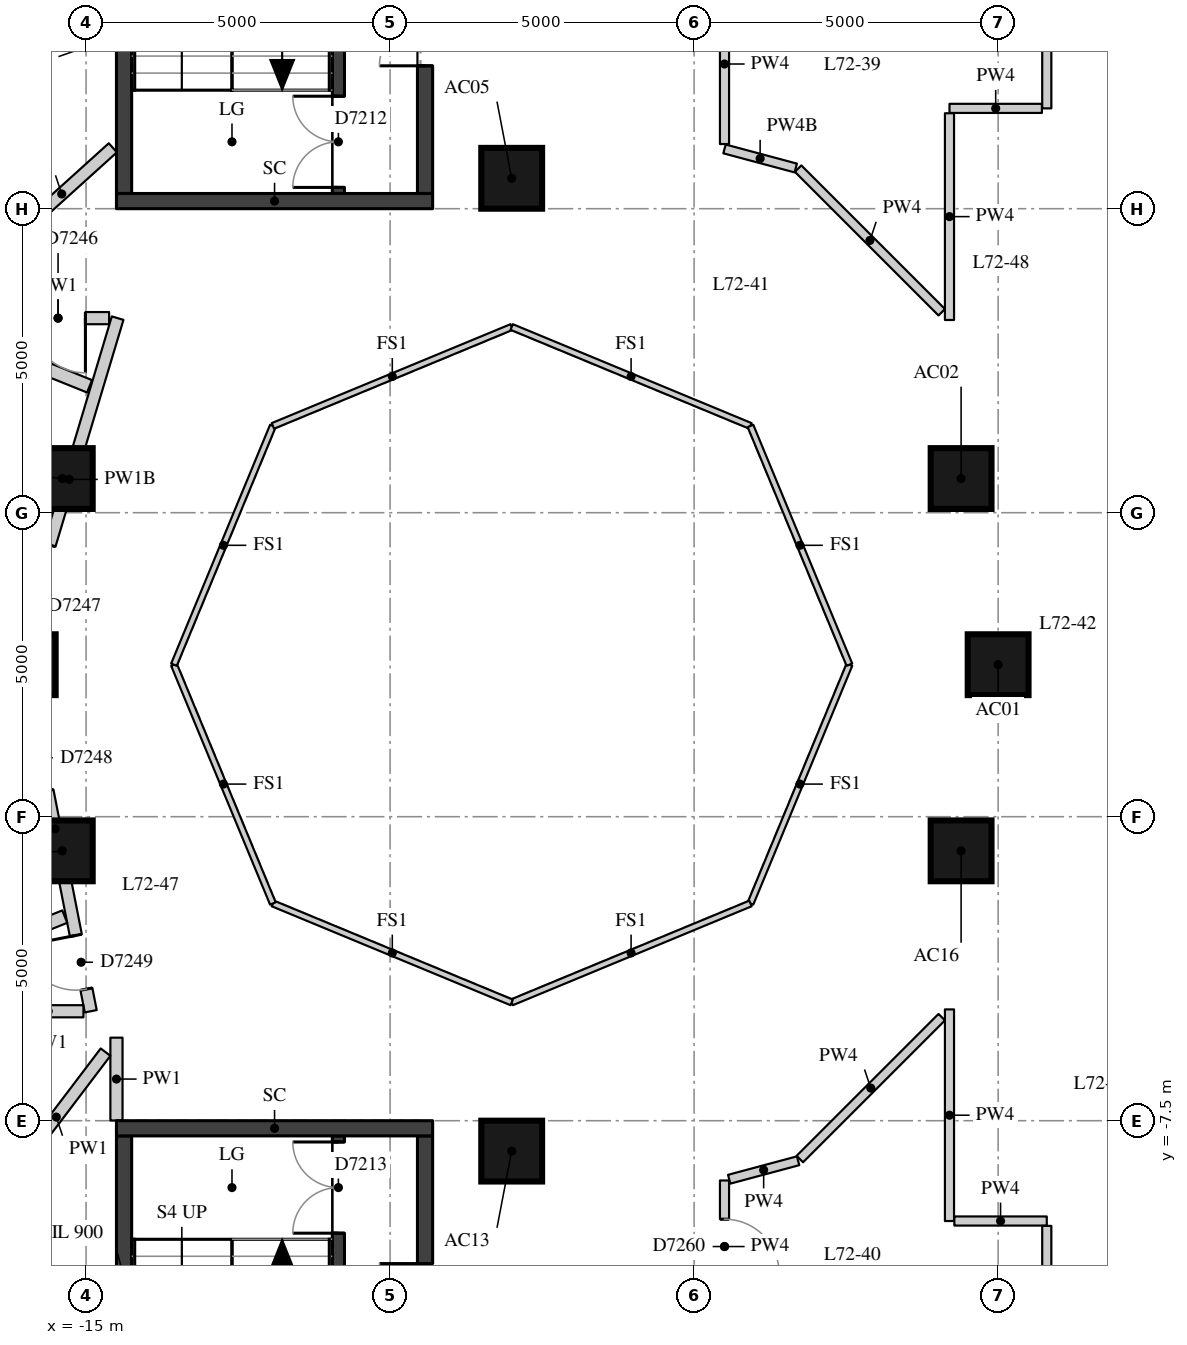
"""IFC4 building model, lengths in metres.
Left out: names, types, materials, properties, quantities, classifications, styles, units other than length and angle.
Written with IfcOpenShell. Run it as: python <this file> out.ifc"""

import sys

from ifc_helpers import new_model, si_unit, direction, frame, frame_2d, origin, origin_2d, place, context, subcontext, project, spatial, rectangle, extrude, element, fill, save


model = new_model("IFC4")
c1 = context("Model", 3, precision=1e-05, world=origin(), true_north=direction((0.0, 1.0)))
c2 = subcontext(c1, "Body", "Model", "MODEL_VIEW")
j1 = project(units=[si_unit("LENGTHUNIT", "METRE"), si_unit("PLANEANGLEUNIT", "RADIAN")], contexts=[c1])
p1 = place(None, origin())
s1 = spatial("IfcSite", under=j1, at=p1, CompositionType="ELEMENT")
p2 = place(p1, origin())
s2 = spatial("IfcBuilding", under=s1, at=p2, CompositionType="ELEMENT")
p3 = place(p2, frame((0.0, 0.0, 253.1)))
s3 = spatial("IfcBuildingStorey", under=s2, at=p3, CompositionType="ELEMENT", Elevation=253.1)
for number, where, z_axis, x_axis in (
    (1, (0.0, 0.0, 0.0), (0.0, 0.0, 1.0), (1.0, 0.0, 0.0)),
    (2, (-0.609, 3.062, 0.0), (0.0, 0.0, 1.0), (1.0, 0.0, 0.0)),
    (3, (-8.0, 8.0, 0.0), (0.0, 0.0, 1.0), (1.0, 0.0, 0.0)),
    (4, (-15.391, 3.062, 0.0), (0.0, 0.0, 1.0), (1.0, 0.0, 0.0)),
    (5, (-16.0, 0.0, 0.0), (0.0, 0.0, 1.0), (1.0, 0.0, 0.0)),
    (6, (-15.391, -3.062, 0.0), (0.0, 0.0, 1.0), (1.0, 0.0, 0.0)),
    (7, (-8.0, -8.0, 0.0), (0.0, 0.0, 1.0), (1.0, 0.0, 0.0)),
    (8, (-0.609, -3.062, 0.0), (0.0, 0.0, 1.0), (1.0, 0.0, 0.0)),
):
    element("IfcColumn", number, at=place(p3, frame(where, z_axis=z_axis, x_axis=x_axis)), inside=s3, PredefinedType="COLUMN", context=c2, shape_type="SweptSolid", body=[
        extrude(rectangle(XDim=1.0, YDim=1.0, at=origin_2d()), origin(), (0.0, 0.0, 1.0), 3.3),
    ])
p4 = place(p3, frame((-10.85, 7.75, 0.0), z_axis=(0.0, 0.0, 1.0), x_axis=(0.0, 1.0, 0.0)))
e9 = element("IfcWall", 9, at=p4, inside=s3, PredefinedType="SHEAR", context=c2, shape_type="SweptSolid", body=[
    extrude(rectangle(XDim=6.0, YDim=0.2, at=frame_2d((3.0, 0.0))), origin(), (0.0, 0.0, 1.0), 3.02),
])
p5 = place(p4, frame((0.1, 0.0, 0.0)))
e10 = element("IfcOpeningElement", 10, at=p5, cuts=e9, PredefinedType="OPENING", context=c2, shape_type="SweptSolid", body=[
    extrude(rectangle(XDim=1.5, YDim=2.1, at=frame_2d((0.75, 1.05))), frame((0.0, 0.11, 0.0), z_axis=(0.0, -1.0, 0.0), x_axis=(1.0, 0.0, 0.0)), (0.0, 0.0, 1.0), 0.22),
])
p6 = place(p3, frame((-10.85, -13.75, 0.0), z_axis=(0.0, 0.0, 1.0), x_axis=(0.0, 1.0, 0.0)))
e11 = element("IfcWall", 11, at=p6, inside=s3, PredefinedType="SHEAR", context=c2, shape_type="SweptSolid", body=[
    extrude(rectangle(XDim=6.0, YDim=0.2, at=frame_2d((3.0, 0.0))), origin(), (0.0, 0.0, 1.0), 3.02),
])
p7 = place(p6, frame((4.4, 0.0, 0.0)))
e12 = element("IfcOpeningElement", 12, at=p7, cuts=e11, PredefinedType="OPENING", context=c2, shape_type="SweptSolid", body=[
    extrude(rectangle(XDim=1.5, YDim=2.1, at=frame_2d((0.75, 1.05))), frame((0.0, 0.11, 0.0), z_axis=(0.0, -1.0, 0.0), x_axis=(1.0, 0.0, 0.0)), (0.0, 0.0, 1.0), 0.22),
])
p8 = place(p3, frame((-14.375, 7.75, -0.28), z_axis=(0.0, 0.0, 1.0), x_axis=(0.0, 1.0, 0.0)))
e13 = element("IfcWall", 13, at=p8, inside=s3, PredefinedType="SHEAR", context=c2, shape_type="SweptSolid", body=[
    extrude(rectangle(XDim=6.0, YDim=0.25, at=frame_2d((3.0, 0.0))), origin(), (0.0, 0.0, 1.0), 3.3),
])
p9 = place(p3, frame((-9.425, 7.75, -0.28), z_axis=(0.0, 0.0, 1.0), x_axis=(0.0, 1.0, 0.0)))
e14 = element("IfcWall", 14, at=p9, inside=s3, PredefinedType="SHEAR", context=c2, shape_type="SweptSolid", body=[
    extrude(rectangle(XDim=6.0, YDim=0.25, at=frame_2d((3.0, 0.0))), origin(), (0.0, 0.0, 1.0), 3.3),
])
p10 = place(p9, frame((2.1, 0.0, 0.28)))
e15 = element("IfcOpeningElement", 15, at=p10, cuts=e14, PredefinedType="OPENING", context=c2, shape_type="SweptSolid", body=[
    extrude(rectangle(XDim=1.5, YDim=2.1, at=frame_2d((0.75, 1.05))), frame((0.0, 0.135, 0.0), z_axis=(0.0, -1.0, 0.0), x_axis=(1.0, 0.0, 0.0)), (0.0, 0.0, 1.0), 0.27),
])
p11 = place(p3, frame((-14.5, 7.625, -0.28), z_axis=(0.0, 0.0, 1.0), x_axis=(1.0, 0.0, 0.0)))
e16 = element("IfcWall", 16, at=p11, inside=s3, PredefinedType="SHEAR", context=c2, shape_type="SweptSolid", body=[
    extrude(rectangle(XDim=5.2, YDim=0.25, at=frame_2d((2.6, 0.0))), origin(), (0.0, 0.0, 1.0), 3.3),
])
p12 = place(p3, frame((-14.375, -13.75, -0.28), z_axis=(0.0, 0.0, 1.0), x_axis=(0.0, 1.0, 0.0)))
e17 = element("IfcWall", 17, at=p12, inside=s3, PredefinedType="SHEAR", context=c2, shape_type="SweptSolid", body=[
    extrude(rectangle(XDim=6.0, YDim=0.25, at=frame_2d((3.0, 0.0))), origin(), (0.0, 0.0, 1.0), 3.3),
])
p13 = place(p3, frame((-9.425, -13.75, -0.28), z_axis=(0.0, 0.0, 1.0), x_axis=(0.0, 1.0, 0.0)))
e18 = element("IfcWall", 18, at=p13, inside=s3, PredefinedType="SHEAR", context=c2, shape_type="SweptSolid", body=[
    extrude(rectangle(XDim=6.0, YDim=0.25, at=frame_2d((3.0, 0.0))), origin(), (0.0, 0.0, 1.0), 3.3),
])
p14 = place(p13, frame((2.4, 0.0, 0.28)))
e19 = element("IfcOpeningElement", 19, at=p14, cuts=e18, PredefinedType="OPENING", context=c2, shape_type="SweptSolid", body=[
    extrude(rectangle(XDim=1.5, YDim=2.1, at=frame_2d((0.75, 1.05))), frame((0.0, 0.135, 0.0), z_axis=(0.0, -1.0, 0.0), x_axis=(1.0, 0.0, 0.0)), (0.0, 0.0, 1.0), 0.27),
])
p15 = place(p3, frame((-14.5, -7.625, -0.28), z_axis=(0.0, 0.0, 1.0), x_axis=(1.0, 0.0, 0.0)))
e20 = element("IfcWall", 20, at=p15, inside=s3, PredefinedType="SHEAR", context=c2, shape_type="SweptSolid", body=[
    extrude(rectangle(XDim=5.2, YDim=0.25, at=frame_2d((2.6, 0.0))), origin(), (0.0, 0.0, 1.0), 3.3),
])
p16 = place(p3, frame((-14.923, -5.7, 0.0), z_axis=(0.0, 0.0, 1.0), x_axis=(-0.192536596074, 0.981289793676, 0.0)))
e21 = element("IfcWall", 21, at=p16, inside=s3, PredefinedType="PARTITIONING", context=c2, shape_type="SweptSolid", body=[
    extrude(rectangle(XDim=6.115, YDim=0.2, at=frame_2d((3.057, 0.0))), origin(), (0.0, 0.0, 1.0), 2.52),
])
p17 = place(p16, frame((3.699, 0.0, 0.0)))
e22 = element("IfcOpeningElement", 22, at=p17, cuts=e21, PredefinedType="OPENING", context=c2, shape_type="SweptSolid", body=[
    extrude(rectangle(XDim=1.1, YDim=2.1, at=frame_2d((0.55, 1.05))), frame((0.0, 0.11, 0.0), z_axis=(0.0, -1.0, 0.0), x_axis=(1.0, 0.0, 0.0)), (0.0, 0.0, 1.0), 0.22),
])
p18 = place(p16, frame((0.372, 0.0, 0.0)))
e23 = element("IfcOpeningElement", 23, at=p18, cuts=e21, PredefinedType="OPENING", context=c2, shape_type="SweptSolid", body=[
    extrude(rectangle(XDim=0.9, YDim=2.1, at=frame_2d((0.45, 1.05))), frame((0.0, 0.11, 0.0), z_axis=(0.0, -1.0, 0.0), x_axis=(1.0, 0.0, 0.0)), (0.0, 0.0, 1.0), 0.22),
])
p19 = place(p3, frame((-16.071, 0.395, 0.0), z_axis=(0.0, 0.0, 1.0), x_axis=(0.287129472402, 0.957891782029, 0.0)))
e24 = element("IfcWall", 24, at=p19, inside=s3, PredefinedType="PARTITIONING", context=c2, shape_type="SweptSolid", body=[
    extrude(rectangle(XDim=5.538, YDim=0.2, at=frame_2d((2.769, 0.0))), origin(), (0.0, 0.0, 1.0), 2.52),
])
p20 = place(p19, frame((0.543, 0.0, 0.0)))
e25 = element("IfcOpeningElement", 25, at=p20, cuts=e24, PredefinedType="OPENING", context=c2, shape_type="SweptSolid", body=[
    extrude(rectangle(XDim=1.1, YDim=2.1, at=frame_2d((0.55, 1.05))), frame((0.0, 0.11, 0.0), z_axis=(0.0, -1.0, 0.0), x_axis=(1.0, 0.0, 0.0)), (0.0, 0.0, 1.0), 0.22),
])
p21 = place(p3, frame((-14.621, 5.7, 0.0), z_axis=(0.0, 0.0, 1.0), x_axis=(-1.0, 0.0, 0.0)))
e26 = element("IfcWall", 26, at=p21, inside=s3, PredefinedType="PARTITIONING", context=c2, shape_type="SweptSolid", body=[
    extrude(rectangle(XDim=1.679, YDim=0.2, at=frame_2d((0.84, 0.0))), origin(), (0.0, 0.0, 1.0), 3.02),
])
p22 = place(p21, frame((0.39, 0.0, 0.0)))
e27 = element("IfcOpeningElement", 27, at=p22, cuts=e26, PredefinedType="OPENING", context=c2, shape_type="SweptSolid", body=[
    extrude(rectangle(XDim=0.9, YDim=2.1, at=frame_2d((0.45, 1.05))), frame((0.0, 0.11, 0.0), z_axis=(0.0, -1.0, 0.0), x_axis=(1.0, 0.0, 0.0)), (0.0, 0.0, 1.0), 0.22),
])
p23 = place(p3, frame((-16.24, 6.984, 0.0), z_axis=(0.0, 0.0, 1.0), x_axis=(0.742140692687, 0.67024412885, 0.0)))
e28 = element("IfcWall", 28, at=p23, inside=s3, PredefinedType="PARTITIONING", context=c2, shape_type="SweptSolid", body=[
    extrude(rectangle(XDim=2.265, YDim=0.2, at=frame_2d((1.132, 0.0))), origin(), (0.0, 0.0, 1.0), 3.02),
])
p24 = place(p3, frame((-14.5, -7.496, 0.0), z_axis=(0.0, 0.0, 1.0), x_axis=(0.0, 1.0, 0.0)))
e29 = element("IfcWall", 29, at=p24, inside=s3, PredefinedType="PARTITIONING", context=c2, shape_type="SweptSolid", body=[
    extrude(rectangle(XDim=1.362, YDim=0.2, at=frame_2d((0.681, 0.0))), origin(), (0.0, 0.0, 1.0), 3.02),
])
p25 = place(p3, frame((-14.679, -6.372, 0.0), z_axis=(0.0, 0.0, 1.0), x_axis=(-0.604258962547, -0.796787993247, 0.0)))
e30 = element("IfcWall", 30, at=p25, inside=s3, PredefinedType="PARTITIONING", context=c2, shape_type="SweptSolid", body=[
    extrude(rectangle(XDim=2.682, YDim=0.2, at=frame_2d((1.341, 0.0))), origin(), (0.0, 0.0, 1.0), 3.02),
])
p26 = place(p3, frame((-16.2, -5.7, 0.0), z_axis=(0.0, 0.0, 1.0), x_axis=(1.0, 0.0, 0.0)))
e31 = element("IfcWall", 31, at=p26, inside=s3, PredefinedType="PARTITIONING", context=c2, shape_type="SweptSolid", body=[
    extrude(rectangle(XDim=1.157, YDim=0.2, at=frame_2d((0.579, 0.0))), origin(), (0.0, 0.0, 1.0), 3.02),
])
p27 = place(p3, frame((0.8, 12.057, 0.0), z_axis=(0.0, 0.0, 1.0), x_axis=(0.0, -1.0, 0.0)))
e32 = element("IfcWall", 32, at=p27, inside=s3, PredefinedType="PARTITIONING", context=c2, shape_type="SweptSolid", body=[
    extrude(rectangle(XDim=2.907, YDim=0.15, at=frame_2d((1.454, 0.0))), origin(), (0.0, 0.0, 1.0), 3.02),
])
p28 = place(p27, frame((1.003, 0.0, 0.0)))
e33 = element("IfcOpeningElement", 33, at=p28, cuts=e32, PredefinedType="OPENING", context=c2, shape_type="SweptSolid", body=[
    extrude(rectangle(XDim=0.9, YDim=2.1, at=frame_2d((0.45, 1.05))), frame((0.0, 0.085, 0.0), z_axis=(0.0, -1.0, 0.0), x_axis=(1.0, 0.0, 0.0)), (0.0, 0.0, 1.0), 0.17),
])
p29 = place(p3, frame((0.72, 9.15, 0.0), z_axis=(0.0, 0.0, 1.0), x_axis=(-1.0, 0.0, 0.0)))
e34 = element("IfcWall", 34, at=p29, inside=s3, PredefinedType="PARTITIONING", context=c2, shape_type="SweptSolid", body=[
    extrude(rectangle(XDim=1.52, YDim=0.15, at=frame_2d((0.76, 0.0))), origin(), (0.0, 0.0, 1.0), 3.02),
])
p30 = place(p3, frame((-0.8, 9.07, 0.0), z_axis=(0.0, 0.0, 1.0), x_axis=(0.0, -1.0, 0.0)))
e35 = element("IfcWall", 35, at=p30, inside=s3, PredefinedType="PARTITIONING", context=c2, shape_type="SweptSolid", body=[
    extrude(rectangle(XDim=3.4, YDim=0.15, at=frame_2d((1.7, 0.0))), origin(), (0.0, 0.0, 1.0), 3.02),
])
p31 = place(p3, frame((-0.927, 5.797, 0.0), z_axis=(0.0, 0.0, 1.0), x_axis=(-0.707106781187, 0.707106781187, 0.0)))
e36 = element("IfcWall", 36, at=p31, inside=s3, PredefinedType="PARTITIONING", context=c2, shape_type="SweptSolid", body=[
    extrude(rectangle(XDim=3.341, YDim=0.15, at=frame_2d((1.67, 0.0))), origin(), (0.0, 0.0, 1.0), 3.02),
])
p32 = place(p3, frame((-3.328, 8.169, 0.0), z_axis=(0.0, 0.0, 1.0), x_axis=(-0.965933680277, 0.258789731841, 0.0)))
e37 = element("IfcWall", 37, at=p32, inside=s3, PredefinedType="PARTITIONING", context=c2, shape_type="SweptSolid", body=[
    extrude(rectangle(XDim=1.213, YDim=0.15, at=frame_2d((0.606, 0.0))), origin(), (0.0, 0.0, 1.0), 2.47),
])
p33 = place(p3, frame((-4.5, 8.563, 0.0), z_axis=(0.0, 0.0, 1.0), x_axis=(0.0, 1.0, 0.0)))
e38 = element("IfcWall", 38, at=p33, inside=s3, PredefinedType="PARTITIONING", context=c2, shape_type="SweptSolid", body=[
    extrude(rectangle(XDim=2.633, YDim=0.15, at=frame_2d((1.316, 0.0))), origin(), (0.0, 0.0, 1.0), 3.02),
])
p34 = place(p3, frame((-0.8, -5.669, 0.0), z_axis=(0.0, 0.0, 1.0), x_axis=(0.0, -1.0, 0.0)))
e39 = element("IfcWall", 39, at=p34, inside=s3, PredefinedType="PARTITIONING", context=c2, shape_type="SweptSolid", body=[
    extrude(rectangle(XDim=3.48, YDim=0.15, at=frame_2d((1.74, 0.0))), origin(), (0.0, 0.0, 1.0), 3.02),
])
p35 = place(p3, frame((-0.72, -9.15, 0.0), z_axis=(0.0, 0.0, 1.0), x_axis=(1.0, 0.0, 0.0)))
e40 = element("IfcWall", 40, at=p35, inside=s3, PredefinedType="PARTITIONING", context=c2, shape_type="SweptSolid", body=[
    extrude(rectangle(XDim=1.52, YDim=0.15, at=frame_2d((0.76, 0.0))), origin(), (0.0, 0.0, 1.0), 3.02),
])
p36 = place(p3, frame((0.8, -9.23, 0.0), z_axis=(0.0, 0.0, 1.0), x_axis=(0.0, -1.0, 0.0)))
e41 = element("IfcWall", 41, at=p36, inside=s3, PredefinedType="PARTITIONING", context=c2, shape_type="SweptSolid", body=[
    extrude(rectangle(XDim=1.934, YDim=0.15, at=frame_2d((0.967, 0.0))), origin(), (0.0, 0.0, 1.0), 3.02),
])
p37 = place(p3, frame((-4.5, -10.656, 0.0), z_axis=(0.0, 0.0, 1.0), x_axis=(0.0, 1.0, 0.0)))
e42 = element("IfcWall", 42, at=p37, inside=s3, PredefinedType="PARTITIONING", context=c2, shape_type="SweptSolid", body=[
    extrude(rectangle(XDim=2.173, YDim=0.15, at=frame_2d((1.087, 0.0))), origin(), (0.0, 0.0, 1.0), 3.02),
])
p38 = place(p37, frame((0.637, 0.0, 0.0)))
e43 = element("IfcOpeningElement", 43, at=p38, cuts=e42, PredefinedType="OPENING", context=c2, shape_type="SweptSolid", body=[
    extrude(rectangle(XDim=0.9, YDim=2.1, at=frame_2d((0.45, 1.05))), frame((0.0, 0.085, 0.0), z_axis=(0.0, -1.0, 0.0), x_axis=(1.0, 0.0, 0.0)), (0.0, 0.0, 1.0), 0.17),
])
p39 = place(p3, frame((-4.423, -8.463, 0.0), z_axis=(0.0, 0.0, 1.0), x_axis=(0.965916469839, 0.258853961327, 0.0)))
e44 = element("IfcWall", 44, at=p39, inside=s3, PredefinedType="PARTITIONING", context=c2, shape_type="SweptSolid", body=[
    extrude(rectangle(XDim=1.173, YDim=0.15, at=frame_2d((0.587, 0.0))), origin(), (0.0, 0.0, 1.0), 3.02),
])
p40 = place(p3, frame((-3.261, -8.131, 0.0), z_axis=(0.0, 0.0, 1.0), x_axis=(0.707106781187, 0.707106781187, 0.0)))
e45 = element("IfcWall", 45, at=p40, inside=s3, PredefinedType="PARTITIONING", context=c2, shape_type="SweptSolid", body=[
    extrude(rectangle(XDim=3.3, YDim=0.15, at=frame_2d((1.65, 0.0))), origin(), (0.0, 0.0, 1.0), 3.02),
])
p41 = place(p3, frame((-22.004, 7.424, 0.0), z_axis=(0.0, 0.0, 1.0), x_axis=(0.927533826991, -0.373739213607, 0.0)))
e46 = element("IfcWall", 46, at=p41, inside=s3, PredefinedType="PARTITIONING", context=c2, shape_type="SweptSolid", body=[
    extrude(rectangle(XDim=7.614, YDim=0.22, at=frame_2d((3.807, 0.0))), origin(), (0.0, 0.0, 1.0), 3.02),
])
p42 = place(p3, frame((-22.004, -6.824, 0.0), z_axis=(0.0, 0.0, 1.0), x_axis=(0.927530164265, 0.373748303513, 0.0)))
e47 = element("IfcWall", 47, at=p42, inside=s3, PredefinedType="PARTITIONING", context=c2, shape_type="SweptSolid", body=[
    extrude(rectangle(XDim=7.174, YDim=0.22, at=frame_2d((3.587, 0.0))), origin(), (0.0, 0.0, 1.0), 3.02),
])
for number, where, z_axis, x_axis in (
    (48, (-2.446, 0.0, 0.0), (0.0, 0.0, 1.0), (-0.383, -0.924, 0.0)),
    (49, (-4.073, -3.927, 0.0), (0.0, 0.0, 1.0), (-0.924, -0.383, 0.0)),
    (50, (-8.0, -5.554, 0.0), (0.0, 0.0, 1.0), (-0.924, 0.383, 0.0)),
    (51, (-11.927, -3.927, 0.0), (0.0, 0.0, 1.0), (-0.383, 0.924, 0.0)),
    (52, (-13.554, 0.0, 0.0), (0.0, 0.0, 1.0), (0.383, 0.924, 0.0)),
    (53, (-11.927, 3.927, 0.0), (0.0, 0.0, 1.0), (0.924, 0.383, 0.0)),
    (54, (-8.0, 5.554, 0.0), (0.0, 0.0, 1.0), (0.924, -0.383, 0.0)),
    (55, (-4.073, 3.927, 0.0), (0.0, 0.0, 1.0), (0.383, -0.924, 0.0)),
):
    element("IfcWall", number, at=place(p3, frame(where, z_axis=z_axis, x_axis=x_axis)), inside=s3, PredefinedType="PARTITIONING", context=c2, shape_type="SweptSolid", body=[
        extrude(rectangle(XDim=4.251, YDim=0.1, at=frame_2d((2.125, 0.0))), origin(), (0.0, 0.0, 1.0), 3.02),
    ])
p43 = place(p5, origin())
e56 = element("IfcDoor", 56, at=p43, inside=s3, OperationType="DOUBLE_DOOR_SINGLE_SWING", PredefinedType="DOOR", context=c2, shape_type="SweptSolid", body=[
    extrude(rectangle(XDim=1.5, YDim=2.1, at=frame_2d((0.75, 1.05))), frame((0.0, 0.025, 0.0), z_axis=(0.0, -1.0, 0.0), x_axis=(1.0, 0.0, 0.0)), (0.0, 0.0, 1.0), 0.05),
])
fill(e10, e56)
p44 = place(p7, origin())
e57 = element("IfcDoor", 57, at=p44, inside=s3, OperationType="DOUBLE_DOOR_SINGLE_SWING", PredefinedType="DOOR", context=c2, shape_type="SweptSolid", body=[
    extrude(rectangle(XDim=1.5, YDim=2.1, at=frame_2d((0.75, 1.05))), frame((0.0, 0.025, 0.0), z_axis=(0.0, -1.0, 0.0), x_axis=(1.0, 0.0, 0.0)), (0.0, 0.0, 1.0), 0.05),
])
fill(e12, e57)
p45 = place(p10, origin())
e58 = element("IfcDoor", 58, at=p45, inside=s3, OperationType="DOUBLE_DOOR_SINGLE_SWING", PredefinedType="DOOR", context=c2, shape_type="SweptSolid", body=[
    extrude(rectangle(XDim=1.5, YDim=2.1, at=frame_2d((0.75, 1.05))), frame((0.0, 0.025, 0.0), z_axis=(0.0, -1.0, 0.0), x_axis=(1.0, 0.0, 0.0)), (0.0, 0.0, 1.0), 0.05),
])
fill(e15, e58)
p46 = place(p14, origin())
e59 = element("IfcDoor", 59, at=p46, inside=s3, OperationType="DOUBLE_DOOR_SINGLE_SWING", PredefinedType="DOOR", context=c2, shape_type="SweptSolid", body=[
    extrude(rectangle(XDim=1.5, YDim=2.1, at=frame_2d((0.75, 1.05))), frame((0.0, 0.025, 0.0), z_axis=(0.0, -1.0, 0.0), x_axis=(1.0, 0.0, 0.0)), (0.0, 0.0, 1.0), 0.05),
])
fill(e19, e59)
p47 = place(p22, origin())
e60 = element("IfcDoor", 60, at=p47, inside=s3, OperationType="SINGLE_SWING_LEFT", PredefinedType="DOOR", context=c2, shape_type="SweptSolid", body=[
    extrude(rectangle(XDim=0.9, YDim=2.1, at=frame_2d((0.45, 1.05))), frame((0.0, 0.025, 0.0), z_axis=(0.0, -1.0, 0.0), x_axis=(1.0, 0.0, 0.0)), (0.0, 0.0, 1.0), 0.05),
])
fill(e27, e60)
p48 = place(p18, origin())
e61 = element("IfcDoor", 61, at=p48, inside=s3, OperationType="SINGLE_SWING_RIGHT", PredefinedType="DOOR", context=c2, shape_type="SweptSolid", body=[
    extrude(rectangle(XDim=0.9, YDim=2.1, at=frame_2d((0.45, 1.05))), frame((0.0, 0.025, 0.0), z_axis=(0.0, -1.0, 0.0), x_axis=(1.0, 0.0, 0.0)), (0.0, 0.0, 1.0), 0.05),
])
fill(e23, e61)
p49 = place(p38, origin())
e62 = element("IfcDoor", 62, at=p49, inside=s3, OperationType="SINGLE_SWING_RIGHT", PredefinedType="DOOR", context=c2, shape_type="SweptSolid", body=[
    extrude(rectangle(XDim=0.9, YDim=2.1, at=frame_2d((0.45, 1.05))), frame((0.0, 0.025, 0.0), z_axis=(0.0, -1.0, 0.0), x_axis=(1.0, 0.0, 0.0)), (0.0, 0.0, 1.0), 0.05),
])
fill(e43, e62)
save(model, sys.argv[1])
